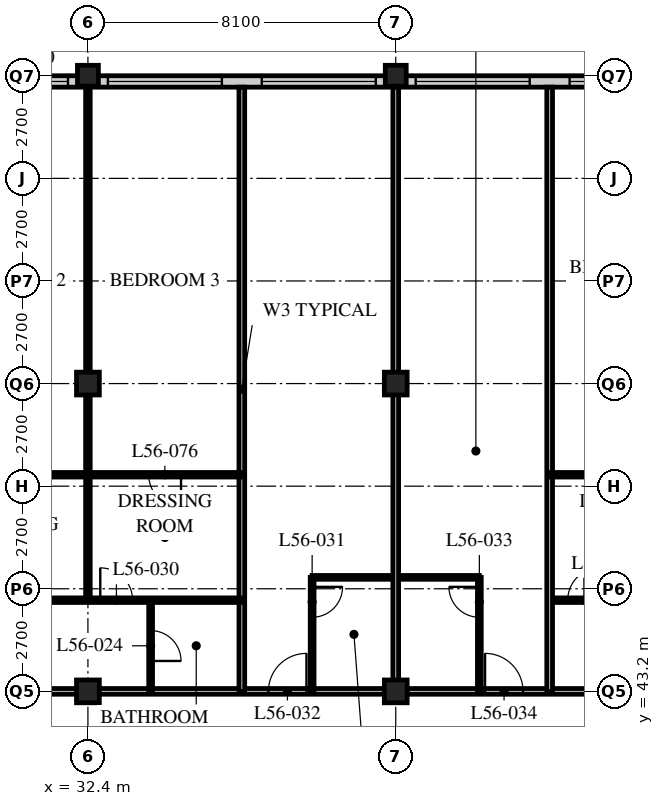
"""IFC4 building model, lengths in metres.
Left out: names, types, materials, properties, quantities, classifications, styles, units other than length and angle.
Written with IfcOpenShell. Run it as: python <this file> out.ifc"""

import sys

from ifc_helpers import new_model, si_unit, direction, frame, frame_2d, origin, origin_2d, place, context, subcontext, project, spatial, rectangle, hollow_rectangle, extrude, element, fill, save


model = new_model("IFC4")
c1 = context("Model", 3, precision=1e-05, world=origin(), true_north=direction((0.0, 1.0)))
c2 = subcontext(c1, "Body", "Model", "MODEL_VIEW")
j1 = project(units=[si_unit("LENGTHUNIT", "METRE"), si_unit("PLANEANGLEUNIT", "RADIAN")], contexts=[c1])
p1 = place(None, origin())
s1 = spatial("IfcSite", under=j1, at=p1, CompositionType="ELEMENT")
p2 = place(p1, origin())
s2 = spatial("IfcBuilding", under=s1, at=p2, CompositionType="ELEMENT")
p3 = place(p2, frame((0.0, 0.0, 217.2)))
s3 = spatial("IfcBuildingStorey", under=s2, at=p3, CompositionType="ELEMENT", Elevation=217.2)
for number, where, z_axis, x_axis in (
    (1, (32.4, 43.2, 0.0), (0.0, 0.0, 1.0), (1.0, 0.0, 0.0)),
    (2, (32.4, 51.3, 0.0), (0.0, 0.0, 1.0), (1.0, 0.0, 0.0)),
):
    element("IfcColumn", number, at=place(p3, frame(where, z_axis=z_axis, x_axis=x_axis)), inside=s3, PredefinedType="COLUMN", context=c2, shape_type="SweptSolid", body=[
        extrude(hollow_rectangle(XDim=0.6, YDim=0.6, WallThickness=0.05, at=origin_2d()), origin(), (0.0, 0.0, 1.0), 3.6),
    ])
p4 = place(p3, frame((32.4, 59.4, 0.0), z_axis=(0.0, 0.0, 1.0), x_axis=(1.0, 0.0, 0.0)))
e3 = element("IfcColumn", 3, at=p4, inside=s3, PredefinedType="COLUMN", context=c2, shape_type="SweptSolid", body=[
    extrude(hollow_rectangle(XDim=0.55, YDim=0.55, WallThickness=0.045, at=origin_2d()), origin(), (0.0, 0.0, 1.0), 3.6),
])
for number, where, z_axis, x_axis in (
    (4, (40.5, 43.2, 0.0), (0.0, 0.0, 1.0), (1.0, 0.0, 0.0)),
    (5, (40.5, 51.3, 0.0), (0.0, 0.0, 1.0), (1.0, 0.0, 0.0)),
):
    element("IfcColumn", number, at=place(p3, frame(where, z_axis=z_axis, x_axis=x_axis)), inside=s3, PredefinedType="COLUMN", context=c2, shape_type="SweptSolid", body=[
        extrude(hollow_rectangle(XDim=0.6, YDim=0.6, WallThickness=0.05, at=origin_2d()), origin(), (0.0, 0.0, 1.0), 3.6),
    ])
p5 = place(p3, frame((40.5, 59.4, 0.0), z_axis=(0.0, 0.0, 1.0), x_axis=(1.0, 0.0, 0.0)))
e6 = element("IfcColumn", 6, at=p5, inside=s3, PredefinedType="COLUMN", context=c2, shape_type="SweptSolid", body=[
    extrude(hollow_rectangle(XDim=0.55, YDim=0.55, WallThickness=0.045, at=origin_2d()), origin(), (0.0, 0.0, 1.0), 3.6),
])
p6 = place(p3, frame((48.3, 59.25, 0.0), z_axis=(0.0, 0.0, 1.0), x_axis=(-1.0, 0.0, 0.0)))
e7 = element("IfcWall", 7, at=p6, inside=s3, PredefinedType="SOLIDWALL", context=c2, shape_type="SweptSolid", body=[
    extrude(rectangle(XDim=40.2, YDim=0.3, at=frame_2d((20.1, 0.0))), origin(), (0.0, 0.0, 1.0), 3.39),
])
p7 = place(p6, frame((0.225, 0.0, 0.6)))
e8 = element("IfcOpeningElement", 8, at=p7, cuts=e7, PredefinedType="OPENING", context=c2, shape_type="SweptSolid", body=[
    extrude(rectangle(XDim=3.0, YDim=2.4, at=frame_2d((1.5, 1.2))), frame((0.0, 0.16, 0.0), z_axis=(0.0, -1.0, 0.0), x_axis=(1.0, 0.0, 0.0)), (0.0, 0.0, 1.0), 0.32),
])
p8 = place(p6, frame((4.275, 0.0, 0.6)))
e9 = element("IfcOpeningElement", 9, at=p8, cuts=e7, PredefinedType="OPENING", context=c2, shape_type="SweptSolid", body=[
    extrude(rectangle(XDim=3.0, YDim=2.4, at=frame_2d((1.5, 1.2))), frame((0.0, 0.16, 0.0), z_axis=(0.0, -1.0, 0.0), x_axis=(1.0, 0.0, 0.0)), (0.0, 0.0, 1.0), 0.32),
])
p9 = place(p6, frame((8.325, 0.0, 0.6)))
e10 = element("IfcOpeningElement", 10, at=p9, cuts=e7, PredefinedType="OPENING", context=c2, shape_type="SweptSolid", body=[
    extrude(rectangle(XDim=3.0, YDim=2.4, at=frame_2d((1.5, 1.2))), frame((0.0, 0.16, 0.0), z_axis=(0.0, -1.0, 0.0), x_axis=(1.0, 0.0, 0.0)), (0.0, 0.0, 1.0), 0.32),
])
p10 = place(p6, frame((12.375, 0.0, 0.6)))
e11 = element("IfcOpeningElement", 11, at=p10, cuts=e7, PredefinedType="OPENING", context=c2, shape_type="SweptSolid", body=[
    extrude(rectangle(XDim=3.0, YDim=2.4, at=frame_2d((1.5, 1.2))), frame((0.0, 0.16, 0.0), z_axis=(0.0, -1.0, 0.0), x_axis=(1.0, 0.0, 0.0)), (0.0, 0.0, 1.0), 0.32),
])
p11 = place(p6, frame((16.425, 0.0, 0.6)))
e12 = element("IfcOpeningElement", 12, at=p11, cuts=e7, PredefinedType="OPENING", context=c2, shape_type="SweptSolid", body=[
    extrude(rectangle(XDim=3.0, YDim=2.4, at=frame_2d((1.5, 1.2))), frame((0.0, 0.16, 0.0), z_axis=(0.0, -1.0, 0.0), x_axis=(1.0, 0.0, 0.0)), (0.0, 0.0, 1.0), 0.32),
])
p12 = place(p6, frame((20.475, 0.0, 0.6)))
e13 = element("IfcOpeningElement", 13, at=p12, cuts=e7, PredefinedType="OPENING", context=c2, shape_type="SweptSolid", body=[
    extrude(rectangle(XDim=3.0, YDim=2.4, at=frame_2d((1.5, 1.2))), frame((0.0, 0.16, 0.0), z_axis=(0.0, -1.0, 0.0), x_axis=(1.0, 0.0, 0.0)), (0.0, 0.0, 1.0), 0.32),
])
p13 = place(p6, frame((24.525, 0.0, 0.6)))
e14 = element("IfcOpeningElement", 14, at=p13, cuts=e7, PredefinedType="OPENING", context=c2, shape_type="SweptSolid", body=[
    extrude(rectangle(XDim=3.0, YDim=2.4, at=frame_2d((1.5, 1.2))), frame((0.0, 0.16, 0.0), z_axis=(0.0, -1.0, 0.0), x_axis=(1.0, 0.0, 0.0)), (0.0, 0.0, 1.0), 0.32),
])
p14 = place(p6, frame((28.575, 0.0, 0.6)))
e15 = element("IfcOpeningElement", 15, at=p14, cuts=e7, PredefinedType="OPENING", context=c2, shape_type="SweptSolid", body=[
    extrude(rectangle(XDim=3.0, YDim=2.4, at=frame_2d((1.5, 1.2))), frame((0.0, 0.16, 0.0), z_axis=(0.0, -1.0, 0.0), x_axis=(1.0, 0.0, 0.0)), (0.0, 0.0, 1.0), 0.32),
])
p15 = place(p6, frame((32.625, 0.0, 0.6)))
e16 = element("IfcOpeningElement", 16, at=p15, cuts=e7, PredefinedType="OPENING", context=c2, shape_type="SweptSolid", body=[
    extrude(rectangle(XDim=3.0, YDim=2.4, at=frame_2d((1.5, 1.2))), frame((0.0, 0.16, 0.0), z_axis=(0.0, -1.0, 0.0), x_axis=(1.0, 0.0, 0.0)), (0.0, 0.0, 1.0), 0.32),
])
p16 = place(p6, frame((36.675, 0.0, 0.6)))
e17 = element("IfcOpeningElement", 17, at=p16, cuts=e7, PredefinedType="OPENING", context=c2, shape_type="SweptSolid", body=[
    extrude(rectangle(XDim=3.0, YDim=2.4, at=frame_2d((1.5, 1.2))), frame((0.0, 0.16, 0.0), z_axis=(0.0, -1.0, 0.0), x_axis=(1.0, 0.0, 0.0)), (0.0, 0.0, 1.0), 0.32),
])
p17 = place(p3, frame((12.15, 43.2, 0.0), z_axis=(0.0, 0.0, 1.0), x_axis=(1.0, 0.0, 0.0)))
e18 = element("IfcWall", 18, at=p17, inside=s3, PredefinedType="PARTITIONING", context=c2, shape_type="SweptSolid", body=[
    extrude(rectangle(XDim=36.45, YDim=0.15, at=frame_2d((18.225, 0.0))), origin(), (0.0, 0.0, 1.0), 2.778),
])
p18 = place(p17, frame((4.95, 0.0, 0.0)))
e19 = element("IfcOpeningElement", 19, at=p18, cuts=e18, PredefinedType="OPENING", context=c2, shape_type="SweptSolid", body=[
    extrude(rectangle(XDim=1.0, YDim=2.1, at=frame_2d((0.5, 1.05))), frame((0.0, 0.085, 0.0), z_axis=(0.0, -1.0, 0.0), x_axis=(1.0, 0.0, 0.0)), (0.0, 0.0, 1.0), 0.17),
])
p19 = place(p17, frame((25.0, 0.0, 0.0)))
e20 = element("IfcOpeningElement", 20, at=p19, cuts=e18, PredefinedType="OPENING", context=c2, shape_type="SweptSolid", body=[
    extrude(rectangle(XDim=1.0, YDim=2.1, at=frame_2d((0.5, 1.05))), frame((0.0, 0.085, 0.0), z_axis=(0.0, -1.0, 0.0), x_axis=(1.0, 0.0, 0.0)), (0.0, 0.0, 1.0), 0.17),
])
p20 = place(p17, frame((30.7, 0.0, 0.0)))
e21 = element("IfcOpeningElement", 21, at=p20, cuts=e18, PredefinedType="OPENING", context=c2, shape_type="SweptSolid", body=[
    extrude(rectangle(XDim=1.0, YDim=2.1, at=frame_2d((0.5, 1.05))), frame((0.0, 0.085, 0.0), z_axis=(0.0, -1.0, 0.0), x_axis=(1.0, 0.0, 0.0)), (0.0, 0.0, 1.0), 0.17),
])
p21 = place(p17, frame((33.925, 0.0, 0.0)))
e22 = element("IfcOpeningElement", 22, at=p21, cuts=e18, PredefinedType="OPENING", context=c2, shape_type="SweptSolid", body=[
    extrude(rectangle(XDim=1.0, YDim=2.1, at=frame_2d((0.5, 1.05))), frame((0.0, 0.085, 0.0), z_axis=(0.0, -1.0, 0.0), x_axis=(1.0, 0.0, 0.0)), (0.0, 0.0, 1.0), 0.17),
])
p22 = place(p17, frame((1.525, 0.0, 0.0)))
e23 = element("IfcOpeningElement", 23, at=p22, cuts=e18, PredefinedType="OPENING", context=c2, shape_type="SweptSolid", body=[
    extrude(rectangle(XDim=1.0, YDim=2.1, at=frame_2d((0.5, 1.05))), frame((0.0, 0.085, 0.0), z_axis=(0.0, -1.0, 0.0), x_axis=(1.0, 0.0, 0.0)), (0.0, 0.0, 1.0), 0.17),
])
p23 = place(p3, frame((34.05, 43.2, 0.0), z_axis=(0.0, 0.0, 1.0), x_axis=(0.0, 1.0, 0.0)))
e24 = element("IfcWall", 24, at=p23, inside=s3, PredefinedType="PARTITIONING", context=c2, shape_type="SweptSolid", body=[
    extrude(rectangle(XDim=2.4, YDim=0.1, at=frame_2d((1.2, 0.0))), origin(), (0.0, 0.0, 1.0), 3.39),
])
p24 = place(p23, frame((0.8, 0.0, 0.0)))
e25 = element("IfcOpeningElement", 25, at=p24, cuts=e24, PredefinedType="OPENING", context=c2, shape_type="SweptSolid", body=[
    extrude(rectangle(XDim=0.8, YDim=2.1, at=frame_2d((0.4, 1.05))), frame((0.0, 0.06, 0.0), z_axis=(0.0, -1.0, 0.0), x_axis=(1.0, 0.0, 0.0)), (0.0, 0.0, 1.0), 0.12),
])
p25 = place(p3, frame((32.4, 45.6, 0.0), z_axis=(0.0, 0.0, 1.0), x_axis=(0.0, 1.0, 0.0)))
e26 = element("IfcWall", 26, at=p25, inside=s3, PredefinedType="PARTITIONING", context=c2, shape_type="SweptSolid", body=[
    extrude(rectangle(XDim=13.5, YDim=0.12, at=frame_2d((6.75, 0.0))), origin(), (0.0, 0.0, 1.0), 2.778),
])
p26 = place(p3, frame((36.45, 43.2, 0.0), z_axis=(0.0, 0.0, 1.0), x_axis=(0.0, 1.0, 0.0)))
e27 = element("IfcWall", 27, at=p26, inside=s3, PredefinedType="PARTITIONING", context=c2, shape_type="SweptSolid", body=[
    extrude(rectangle(XDim=15.9, YDim=0.15, at=frame_2d((7.95, 0.0))), origin(), (0.0, 0.0, 1.0), 3.39),
])
p27 = place(p3, frame((38.3, 46.2, 0.0), z_axis=(0.0, 0.0, 1.0), x_axis=(1.0, 0.0, 0.0)))
e28 = element("IfcWall", 28, at=p27, inside=s3, PredefinedType="PARTITIONING", context=c2, shape_type="SweptSolid", body=[
    extrude(rectangle(XDim=4.4, YDim=0.1, at=frame_2d((2.2, 0.0))), origin(), (0.0, 0.0, 1.0), 3.39),
])
p28 = place(p3, frame((38.3, 43.2, 0.0), z_axis=(0.0, 0.0, 1.0), x_axis=(0.0, 1.0, 0.0)))
e29 = element("IfcWall", 29, at=p28, inside=s3, PredefinedType="PARTITIONING", context=c2, shape_type="SweptSolid", body=[
    extrude(rectangle(XDim=3.0, YDim=0.1, at=frame_2d((1.5, 0.0))), origin(), (0.0, 0.0, 1.0), 3.39),
])
p29 = place(p28, frame((1.95, 0.0, 0.0)))
e30 = element("IfcOpeningElement", 30, at=p29, cuts=e29, PredefinedType="OPENING", context=c2, shape_type="SweptSolid", body=[
    extrude(rectangle(XDim=0.8, YDim=2.1, at=frame_2d((0.4, 1.05))), frame((0.0, 0.06, 0.0), z_axis=(0.0, -1.0, 0.0), x_axis=(1.0, 0.0, 0.0)), (0.0, 0.0, 1.0), 0.12),
])
p30 = place(p3, frame((40.5, 43.2, 0.0), z_axis=(0.0, 0.0, 1.0), x_axis=(0.0, 1.0, 0.0)))
e31 = element("IfcWall", 31, at=p30, inside=s3, PredefinedType="PARTITIONING", context=c2, shape_type="SweptSolid", body=[
    extrude(rectangle(XDim=15.9, YDim=0.15, at=frame_2d((7.95, 0.0))), origin(), (0.0, 0.0, 1.0), 2.778),
])
p31 = place(p3, frame((42.7, 43.2, 0.0), z_axis=(0.0, 0.0, 1.0), x_axis=(0.0, 1.0, 0.0)))
e32 = element("IfcWall", 32, at=p31, inside=s3, PredefinedType="PARTITIONING", context=c2, shape_type="SweptSolid", body=[
    extrude(rectangle(XDim=3.0, YDim=0.1, at=frame_2d((1.5, 0.0))), origin(), (0.0, 0.0, 1.0), 3.39),
])
p32 = place(p31, frame((1.95, 0.0, 0.0)))
e33 = element("IfcOpeningElement", 33, at=p32, cuts=e32, PredefinedType="OPENING", context=c2, shape_type="SweptSolid", body=[
    extrude(rectangle(XDim=0.8, YDim=2.1, at=frame_2d((0.4, 1.05))), frame((0.0, 0.06, 0.0), z_axis=(0.0, -1.0, 0.0), x_axis=(1.0, 0.0, 0.0)), (0.0, 0.0, 1.0), 0.12),
])
p33 = place(p3, frame((44.55, 45.6, 0.0), z_axis=(0.0, 0.0, 1.0), x_axis=(1.0, 0.0, 0.0)))
e34 = element("IfcWall", 34, at=p33, inside=s3, PredefinedType="PARTITIONING", context=c2, shape_type="SweptSolid", body=[
    extrude(rectangle(XDim=8.05, YDim=0.12, at=frame_2d((4.025, 0.0))), origin(), (0.0, 0.0, 1.0), 3.39),
])
p34 = place(p33, frame((0.475, 0.0, 0.0)))
e35 = element("IfcOpeningElement", 35, at=p34, cuts=e34, PredefinedType="OPENING", context=c2, shape_type="SweptSolid", body=[
    extrude(rectangle(XDim=0.85, YDim=2.1, at=frame_2d((0.425, 1.05))), frame((0.0, 0.07, 0.0), z_axis=(0.0, -1.0, 0.0), x_axis=(1.0, 0.0, 0.0)), (0.0, 0.0, 1.0), 0.14),
])
p35 = place(p33, frame((4.325, 0.0, 0.0)))
e36 = element("IfcOpeningElement", 36, at=p35, cuts=e34, PredefinedType="OPENING", context=c2, shape_type="SweptSolid", body=[
    extrude(rectangle(XDim=0.85, YDim=2.1, at=frame_2d((0.425, 1.05))), frame((0.0, 0.07, 0.0), z_axis=(0.0, -1.0, 0.0), x_axis=(1.0, 0.0, 0.0)), (0.0, 0.0, 1.0), 0.14),
])
p36 = place(p3, frame((44.55, 43.2, 0.0), z_axis=(0.0, 0.0, 1.0), x_axis=(0.0, 1.0, 0.0)))
e37 = element("IfcWall", 37, at=p36, inside=s3, PredefinedType="PARTITIONING", context=c2, shape_type="SweptSolid", body=[
    extrude(rectangle(XDim=15.9, YDim=0.15, at=frame_2d((7.95, 0.0))), origin(), (0.0, 0.0, 1.0), 3.39),
])
p37 = place(p3, frame((8.15, 45.6, 0.0), z_axis=(0.0, 0.0, 1.0), x_axis=(1.0, 0.0, 0.0)))
e38 = element("IfcWall", 38, at=p37, inside=s3, PredefinedType="PARTITIONING", context=c2, shape_type="SweptSolid", body=[
    extrude(rectangle(XDim=28.3, YDim=0.12, at=frame_2d((14.15, 0.0))), origin(), (0.0, 0.0, 1.0), 3.39),
])
p38 = place(p37, frame((9.025, 0.0, 0.0)))
e39 = element("IfcOpeningElement", 39, at=p38, cuts=e38, PredefinedType="OPENING", context=c2, shape_type="SweptSolid", body=[
    extrude(rectangle(XDim=0.85, YDim=2.1, at=frame_2d((0.425, 1.05))), frame((0.0, 0.07, 0.0), z_axis=(0.0, -1.0, 0.0), x_axis=(1.0, 0.0, 0.0)), (0.0, 0.0, 1.0), 0.14),
])
p39 = place(p37, frame((16.475, 0.0, 0.0)))
e40 = element("IfcOpeningElement", 40, at=p39, cuts=e38, PredefinedType="OPENING", context=c2, shape_type="SweptSolid", body=[
    extrude(rectangle(XDim=0.85, YDim=2.1, at=frame_2d((0.425, 1.05))), frame((0.0, 0.07, 0.0), z_axis=(0.0, -1.0, 0.0), x_axis=(1.0, 0.0, 0.0)), (0.0, 0.0, 1.0), 0.14),
])
p40 = place(p37, frame((20.525, 0.0, 0.0)))
e41 = element("IfcOpeningElement", 41, at=p40, cuts=e38, PredefinedType="OPENING", context=c2, shape_type="SweptSolid", body=[
    extrude(rectangle(XDim=0.85, YDim=2.1, at=frame_2d((0.425, 1.05))), frame((0.0, 0.07, 0.0), z_axis=(0.0, -1.0, 0.0), x_axis=(1.0, 0.0, 0.0)), (0.0, 0.0, 1.0), 0.14),
])
p41 = place(p37, frame((24.575, 0.0, 0.0)))
e42 = element("IfcOpeningElement", 42, at=p41, cuts=e38, PredefinedType="OPENING", context=c2, shape_type="SweptSolid", body=[
    extrude(rectangle(XDim=0.85, YDim=2.1, at=frame_2d((0.425, 1.05))), frame((0.0, 0.07, 0.0), z_axis=(0.0, -1.0, 0.0), x_axis=(1.0, 0.0, 0.0)), (0.0, 0.0, 1.0), 0.14),
])
p42 = place(p37, frame((6.725, 0.0, 0.0)))
e43 = element("IfcOpeningElement", 43, at=p42, cuts=e38, PredefinedType="OPENING", context=c2, shape_type="SweptSolid", body=[
    extrude(rectangle(XDim=0.85, YDim=2.1, at=frame_2d((0.425, 1.05))), frame((0.0, 0.07, 0.0), z_axis=(0.0, -1.0, 0.0), x_axis=(1.0, 0.0, 0.0)), (0.0, 0.0, 1.0), 0.14),
])
p43 = place(p37, frame((2.875, 0.0, 0.0)))
e44 = element("IfcOpeningElement", 44, at=p43, cuts=e38, PredefinedType="OPENING", context=c2, shape_type="SweptSolid", body=[
    extrude(rectangle(XDim=0.85, YDim=2.1, at=frame_2d((0.425, 1.05))), frame((0.0, 0.07, 0.0), z_axis=(0.0, -1.0, 0.0), x_axis=(1.0, 0.0, 0.0)), (0.0, 0.0, 1.0), 0.14),
])
p44 = place(p3, frame((28.35, 48.9, 0.0), z_axis=(0.0, 0.0, 1.0), x_axis=(1.0, 0.0, 0.0)))
e45 = element("IfcWall", 45, at=p44, inside=s3, PredefinedType="PARTITIONING", context=c2, shape_type="SweptSolid", body=[
    extrude(rectangle(XDim=8.1, YDim=0.12, at=frame_2d((4.05, 0.0))), origin(), (0.0, 0.0, 1.0), 3.39),
])
p45 = place(p44, frame((1.6, 0.0, 0.0)))
e46 = element("IfcOpeningElement", 46, at=p45, cuts=e45, PredefinedType="OPENING", context=c2, shape_type="SweptSolid", body=[
    extrude(rectangle(XDim=0.85, YDim=2.1, at=frame_2d((0.425, 1.05))), frame((0.0, 0.07, 0.0), z_axis=(0.0, -1.0, 0.0), x_axis=(1.0, 0.0, 0.0)), (0.0, 0.0, 1.0), 0.14),
])
p46 = place(p44, frame((5.65, 0.0, 0.0)))
e47 = element("IfcOpeningElement", 47, at=p46, cuts=e45, PredefinedType="OPENING", context=c2, shape_type="SweptSolid", body=[
    extrude(rectangle(XDim=0.85, YDim=2.1, at=frame_2d((0.425, 1.05))), frame((0.0, 0.07, 0.0), z_axis=(0.0, -1.0, 0.0), x_axis=(1.0, 0.0, 0.0)), (0.0, 0.0, 1.0), 0.14),
])
p47 = place(p3, frame((44.55, 48.9, 0.0), z_axis=(0.0, 0.0, 1.0), x_axis=(1.0, 0.0, 0.0)))
e48 = element("IfcWall", 48, at=p47, inside=s3, PredefinedType="PARTITIONING", context=c2, shape_type="SweptSolid", body=[
    extrude(rectangle(XDim=4.05, YDim=0.12, at=frame_2d((2.025, 0.0))), origin(), (0.0, 0.0, 1.0), 3.39),
])
p48 = place(p47, frame((1.6, 0.0, 0.0)))
e49 = element("IfcOpeningElement", 49, at=p48, cuts=e48, PredefinedType="OPENING", context=c2, shape_type="SweptSolid", body=[
    extrude(rectangle(XDim=0.85, YDim=2.1, at=frame_2d((0.425, 1.05))), frame((0.0, 0.07, 0.0), z_axis=(0.0, -1.0, 0.0), x_axis=(1.0, 0.0, 0.0)), (0.0, 0.0, 1.0), 0.14),
])
p49 = place(p7, origin())
e50 = element("IfcWindow", 50, at=p49, inside=s3, PartitioningType="SINGLE_PANEL", PredefinedType="WINDOW", context=c2, shape_type="SweptSolid", body=[
    extrude(rectangle(XDim=3.0, YDim=2.4, at=frame_2d((1.5, 1.2))), frame((0.0, 0.03, 0.0), z_axis=(0.0, -1.0, 0.0), x_axis=(1.0, 0.0, 0.0)), (0.0, 0.0, 1.0), 0.06),
])
fill(e8, e50)
p50 = place(p8, origin())
e51 = element("IfcWindow", 51, at=p50, inside=s3, PartitioningType="SINGLE_PANEL", PredefinedType="WINDOW", context=c2, shape_type="SweptSolid", body=[
    extrude(rectangle(XDim=3.0, YDim=2.4, at=frame_2d((1.5, 1.2))), frame((0.0, 0.03, 0.0), z_axis=(0.0, -1.0, 0.0), x_axis=(1.0, 0.0, 0.0)), (0.0, 0.0, 1.0), 0.06),
])
fill(e9, e51)
p51 = place(p9, origin())
e52 = element("IfcWindow", 52, at=p51, inside=s3, PartitioningType="SINGLE_PANEL", PredefinedType="WINDOW", context=c2, shape_type="SweptSolid", body=[
    extrude(rectangle(XDim=3.0, YDim=2.4, at=frame_2d((1.5, 1.2))), frame((0.0, 0.03, 0.0), z_axis=(0.0, -1.0, 0.0), x_axis=(1.0, 0.0, 0.0)), (0.0, 0.0, 1.0), 0.06),
])
fill(e10, e52)
p52 = place(p10, origin())
e53 = element("IfcWindow", 53, at=p52, inside=s3, PartitioningType="SINGLE_PANEL", PredefinedType="WINDOW", context=c2, shape_type="SweptSolid", body=[
    extrude(rectangle(XDim=3.0, YDim=2.4, at=frame_2d((1.5, 1.2))), frame((0.0, 0.03, 0.0), z_axis=(0.0, -1.0, 0.0), x_axis=(1.0, 0.0, 0.0)), (0.0, 0.0, 1.0), 0.06),
])
fill(e11, e53)
p53 = place(p11, origin())
e54 = element("IfcWindow", 54, at=p53, inside=s3, PartitioningType="SINGLE_PANEL", PredefinedType="WINDOW", context=c2, shape_type="SweptSolid", body=[
    extrude(rectangle(XDim=3.0, YDim=2.4, at=frame_2d((1.5, 1.2))), frame((0.0, 0.03, 0.0), z_axis=(0.0, -1.0, 0.0), x_axis=(1.0, 0.0, 0.0)), (0.0, 0.0, 1.0), 0.06),
])
fill(e12, e54)
p54 = place(p24, origin())
e55 = element("IfcDoor", 55, at=p54, inside=s3, OperationType="SINGLE_SWING_RIGHT", PredefinedType="DOOR", context=c2, shape_type="SweptSolid", body=[
    extrude(rectangle(XDim=0.8, YDim=2.1, at=frame_2d((0.4, 1.05))), frame((0.0, 0.025, 0.0), z_axis=(0.0, -1.0, 0.0), x_axis=(1.0, 0.0, 0.0)), (0.0, 0.0, 1.0), 0.05),
])
fill(e25, e55)
p55 = place(p41, origin())
e56 = element("IfcDoor", 56, at=p55, inside=s3, OperationType="SINGLE_SWING_LEFT", PredefinedType="DOOR", context=c2, shape_type="SweptSolid", body=[
    extrude(rectangle(XDim=0.85, YDim=2.1, at=frame_2d((0.425, 1.05))), frame((0.0, 0.025, 0.0), z_axis=(0.0, -1.0, 0.0), x_axis=(1.0, 0.0, 0.0)), (0.0, 0.0, 1.0), 0.05),
])
fill(e42, e56)
p56 = place(p29, origin())
e57 = element("IfcDoor", 57, at=p56, inside=s3, OperationType="SINGLE_SWING_LEFT", PredefinedType="DOOR", context=c2, shape_type="SweptSolid", body=[
    extrude(rectangle(XDim=0.8, YDim=2.1, at=frame_2d((0.4, 1.05))), frame((0.0, 0.025, 0.0), z_axis=(0.0, -1.0, 0.0), x_axis=(1.0, 0.0, 0.0)), (0.0, 0.0, 1.0), 0.05),
])
fill(e30, e57)
p57 = place(p19, origin())
e58 = element("IfcDoor", 58, at=p57, inside=s3, OperationType="SINGLE_SWING_RIGHT", PredefinedType="DOOR", context=c2, shape_type="SweptSolid", body=[
    extrude(rectangle(XDim=1.0, YDim=2.1, at=frame_2d((0.5, 1.05))), frame((0.0, 0.025, 0.0), z_axis=(0.0, -1.0, 0.0), x_axis=(1.0, 0.0, 0.0)), (0.0, 0.0, 1.0), 0.05),
])
fill(e20, e58)
p58 = place(p32, origin())
e59 = element("IfcDoor", 59, at=p58, inside=s3, OperationType="SINGLE_SWING_RIGHT", PredefinedType="DOOR", context=c2, shape_type="SweptSolid", body=[
    extrude(rectangle(XDim=0.8, YDim=2.1, at=frame_2d((0.4, 1.05))), frame((0.0, 0.025, 0.0), z_axis=(0.0, -1.0, 0.0), x_axis=(1.0, 0.0, 0.0)), (0.0, 0.0, 1.0), 0.05),
])
fill(e33, e59)
p59 = place(p20, origin())
e60 = element("IfcDoor", 60, at=p59, inside=s3, OperationType="SINGLE_SWING_LEFT", PredefinedType="DOOR", context=c2, shape_type="SweptSolid", body=[
    extrude(rectangle(XDim=1.0, YDim=2.1, at=frame_2d((0.5, 1.05))), frame((0.0, 0.025, 0.0), z_axis=(0.0, -1.0, 0.0), x_axis=(1.0, 0.0, 0.0)), (0.0, 0.0, 1.0), 0.05),
])
fill(e21, e60)
p60 = place(p34, origin())
e61 = element("IfcDoor", 61, at=p60, inside=s3, OperationType="SINGLE_SWING_RIGHT", PredefinedType="DOOR", context=c2, shape_type="SweptSolid", body=[
    extrude(rectangle(XDim=0.85, YDim=2.1, at=frame_2d((0.425, 1.05))), frame((0.0, 0.025, 0.0), z_axis=(0.0, -1.0, 0.0), x_axis=(1.0, 0.0, 0.0)), (0.0, 0.0, 1.0), 0.05),
])
fill(e35, e61)
p61 = place(p46, origin())
e62 = element("IfcDoor", 62, at=p61, inside=s3, OperationType="SINGLE_SWING_LEFT", PredefinedType="DOOR", context=c2, shape_type="SweptSolid", body=[
    extrude(rectangle(XDim=0.85, YDim=2.1, at=frame_2d((0.425, 1.05))), frame((0.0, 0.025, 0.0), z_axis=(0.0, -1.0, 0.0), x_axis=(1.0, 0.0, 0.0)), (0.0, 0.0, 1.0), 0.05),
])
fill(e47, e62)
save(model, sys.argv[1])
